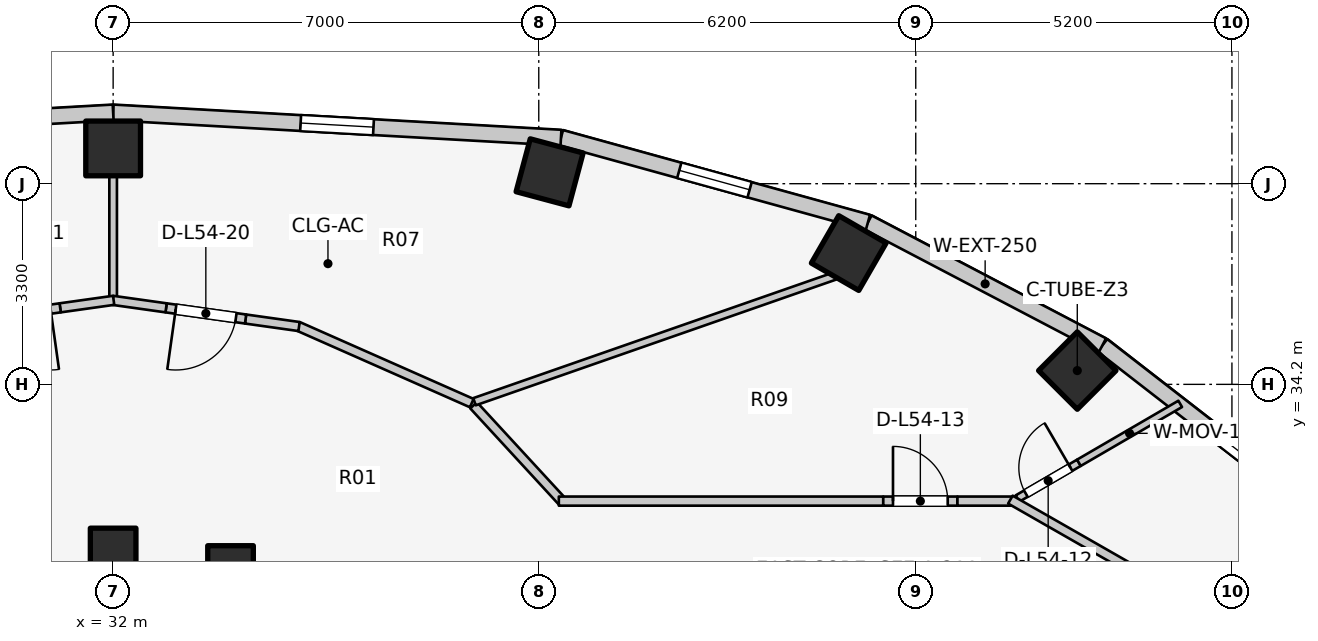
"""IFC4 building model, lengths in metres.
Left out: names, types, materials, properties, quantities, classifications, styles, units other than length and angle.
Written with IfcOpenShell. Run it as: python <this file> out.ifc"""

import sys

from ifc_helpers import new_model, si_unit, direction, frame, frame_2d, origin, origin_2d, place, context, subcontext, project, spatial, rectangle, extrude, element, fill, save


model = new_model("IFC4")
c1 = context("Model", 3, precision=1e-05, world=origin(), true_north=direction((0.0, 1.0)))
c2 = subcontext(c1, "Body", "Model", "MODEL_VIEW")
j1 = project(units=[si_unit("LENGTHUNIT", "METRE"), si_unit("PLANEANGLEUNIT", "RADIAN")], contexts=[c1])
p1 = place(None, origin())
s1 = spatial("IfcSite", under=j1, at=p1, CompositionType="ELEMENT")
p2 = place(p1, origin())
s2 = spatial("IfcBuilding", under=s1, at=p2, CompositionType="ELEMENT")
p3 = place(p2, frame((0.0, 0.0, 177.7)))
s3 = spatial("IfcBuildingStorey", under=s2, at=p3, CompositionType="ELEMENT", Elevation=177.7)
for number, where, z_axis, x_axis in (
    (1, (47.857, 34.427, 0.0), (0.0, 0.0, 1.0), (0.707, 0.707, 0.0)),
    (2, (44.098, 36.359, 0.0), (0.0, 0.0, 1.0), (0.5, 0.866, 0.0)),
):
    element("IfcColumn", number, at=place(p3, frame(where, z_axis=z_axis, x_axis=x_axis)), inside=s3, PredefinedType="COLUMN", context=c2, shape_type="SweptSolid", body=[
        extrude(rectangle(XDim=0.9, YDim=0.9, at=origin_2d()), origin(), (0.0, 0.0, 1.0), 3.1),
    ])
p4 = place(p3, frame((33.931, 31.172, 0.0), z_axis=(0.0, 0.0, 1.0), x_axis=(1.0, 0.0, 0.0)))
e3 = element("IfcColumn", 3, at=p4, inside=s3, PredefinedType="COLUMN", context=c2, shape_type="SweptSolid", body=[
    extrude(rectangle(XDim=0.75, YDim=0.75, at=origin_2d()), origin(), (0.0, 0.0, 1.0), 3.1),
])
p5 = place(p3, frame((39.178, 37.687, 0.0), z_axis=(0.0, 0.0, 1.0), x_axis=(0.258819045103, 0.965925826289, 0.0)))
e4 = element("IfcColumn", 4, at=p5, inside=s3, PredefinedType="COLUMN", context=c2, shape_type="SweptSolid", body=[
    extrude(rectangle(XDim=0.9, YDim=0.9, at=origin_2d()), origin(), (0.0, 0.0, 1.0), 3.1),
])
p6 = place(p3, frame((32.0, 31.46, 0.0), z_axis=(0.0, 0.0, 1.0), x_axis=(1.0, 0.0, 0.0)))
e5 = element("IfcColumn", 5, at=p6, inside=s3, PredefinedType="COLUMN", context=c2, shape_type="SweptSolid", body=[
    extrude(rectangle(XDim=0.75, YDim=0.75, at=origin_2d()), origin(), (0.0, 0.0, 1.0), 3.1),
])
p7 = place(p3, frame((32.0, 38.08, 0.0), z_axis=(0.0, 0.0, 1.0), x_axis=(0.0, 1.0, 0.0)))
e6 = element("IfcColumn", 6, at=p7, inside=s3, PredefinedType="COLUMN", context=c2, shape_type="SweptSolid", body=[
    extrude(rectangle(XDim=0.9, YDim=0.9, at=origin_2d()), origin(), (0.0, 0.0, 1.0), 3.1),
])
p8 = place(p3, frame((51.619, 32.243, 0.0), z_axis=(0.0, 0.0, 1.0), x_axis=(-0.790185650662, 0.612867552973, 0.0)))
e7 = element("IfcWall", 7, at=p8, inside=s3, PredefinedType="STANDARD", context=c2, shape_type="SweptSolid", body=[
    extrude(rectangle(XDim=4.239, YDim=0.26, at=frame_2d((2.12, 0.0))), origin(), (0.0, 0.0, 1.0), 1.22),
])
p9 = place(p8, frame((0.749, 0.0, 0.15)))
e8 = element("IfcOpeningElement", 8, at=p9, cuts=e7, PredefinedType="OPENING", context=c2, shape_type="SweptSolid", body=[
    extrude(rectangle(XDim=1.2, YDim=0.9, at=frame_2d((0.6, 0.45))), frame((0.0, 0.14, 0.0), z_axis=(0.0, -1.0, 0.0), x_axis=(1.0, 0.0, 0.0)), (0.0, 0.0, 1.0), 0.28),
])
p10 = place(p3, frame((48.269, 34.842, 0.0), z_axis=(0.0, 0.0, 1.0), x_axis=(-0.885660265226, 0.464333818065, 0.0)))
e9 = element("IfcWall", 9, at=p10, inside=s3, PredefinedType="STANDARD", context=c2, shape_type="SweptSolid", body=[
    extrude(rectangle(XDim=4.354, YDim=0.26, at=frame_2d((2.177, 0.0))), origin(), (0.0, 0.0, 1.0), 1.22),
])
p11 = place(p3, frame((44.413, 36.863, 0.0), z_axis=(0.0, 0.0, 1.0), x_axis=(-0.963953455704, 0.26607092144, 0.0)))
e10 = element("IfcWall", 10, at=p11, inside=s3, PredefinedType="STANDARD", context=c2, shape_type="SweptSolid", body=[
    extrude(rectangle(XDim=5.237, YDim=0.26, at=frame_2d((2.618, 0.0))), origin(), (0.0, 0.0, 1.0), 1.22),
])
p12 = place(p11, frame((2.018, 0.0, 0.15)))
e11 = element("IfcOpeningElement", 11, at=p12, cuts=e10, PredefinedType="OPENING", context=c2, shape_type="SweptSolid", body=[
    extrude(rectangle(XDim=1.2, YDim=0.9, at=frame_2d((0.6, 0.45))), frame((0.0, 0.14, 0.0), z_axis=(0.0, -1.0, 0.0), x_axis=(1.0, 0.0, 0.0)), (0.0, 0.0, 1.0), 0.28),
])
p13 = place(p3, frame((39.365, 38.257, 0.0), z_axis=(0.0, 0.0, 1.0), x_axis=(-0.998417906562, 0.056228852534, 0.0)))
e12 = element("IfcWall", 12, at=p13, inside=s3, PredefinedType="STANDARD", context=c2, shape_type="SweptSolid", body=[
    extrude(rectangle(XDim=7.377, YDim=0.26, at=frame_2d((3.688, 0.0))), origin(), (0.0, 0.0, 1.0), 1.22),
])
p14 = place(p13, frame((3.088, 0.0, 0.15)))
e13 = element("IfcOpeningElement", 13, at=p14, cuts=e12, PredefinedType="OPENING", context=c2, shape_type="SweptSolid", body=[
    extrude(rectangle(XDim=1.2, YDim=0.9, at=frame_2d((0.6, 0.45))), frame((0.0, 0.14, 0.0), z_axis=(0.0, -1.0, 0.0), x_axis=(1.0, 0.0, 0.0)), (0.0, 0.0, 1.0), 0.28),
])
p15 = place(p3, frame((32.0, 38.671, 0.0), z_axis=(0.0, 0.0, 1.0), x_axis=(-0.998417906562, -0.056228852534, 0.0)))
e14 = element("IfcWall", 14, at=p15, inside=s3, PredefinedType="STANDARD", context=c2, shape_type="SweptSolid", body=[
    extrude(rectangle(XDim=7.377, YDim=0.26, at=frame_2d((3.688, 0.0))), origin(), (0.0, 0.0, 1.0), 1.22),
])
p16 = place(p15, frame((3.088, 0.0, 0.15)))
e15 = element("IfcOpeningElement", 15, at=p16, cuts=e14, PredefinedType="OPENING", context=c2, shape_type="SweptSolid", body=[
    extrude(rectangle(XDim=1.2, YDim=0.9, at=frame_2d((0.6, 0.45))), frame((0.0, 0.14, 0.0), z_axis=(0.0, -1.0, 0.0), x_axis=(1.0, 0.0, 0.0)), (0.0, 0.0, 1.0), 0.28),
])
p17 = place(p3, frame((46.872, 32.322, 0.0), z_axis=(0.0, 0.0, 1.0), x_axis=(0.864338442283, 0.502910585683, 0.0)))
e16 = element("IfcWall", 16, at=p17, inside=s3, PredefinedType="MOVABLE", context=c2, shape_type="SweptSolid", body=[
    extrude(rectangle(XDim=1.17, YDim=0.12, at=frame_2d((0.585, 0.0))), origin(), (0.0, 0.0, 1.0), 2.11),
])
p18 = place(p17, frame((0.16, 0.0, 0.0)))
e17 = element("IfcOpeningElement", 17, at=p18, cuts=e16, PredefinedType="OPENING", context=c2, shape_type="SweptSolid", body=[
    extrude(rectangle(XDim=0.85, YDim=2.05, at=frame_2d((0.425, 1.025))), frame((0.0, 0.07, 0.0), z_axis=(0.0, -1.0, 0.0), x_axis=(1.0, 0.0, 0.0)), (0.0, 0.0, 1.0), 0.14),
])
p19 = place(p3, frame((47.884, 32.91, 0.0), z_axis=(0.0, 0.0, 1.0), x_axis=(0.864444446654, 0.50272835473, 0.0)))
e18 = element("IfcWall", 18, at=p19, inside=s3, PredefinedType="MOVABLE", context=c2, shape_type="SweptSolid", body=[
    extrude(rectangle(XDim=1.927, YDim=0.12, at=frame_2d((0.963, 0.0))), origin(), (0.0, 0.0, 1.0), 1.22),
])
p20 = place(p3, frame((37.928, 33.856, 0.0), z_axis=(0.0, 0.0, 1.0), x_axis=(0.677579737957, -0.735449317567, 0.0)))
e19 = element("IfcWall", 19, at=p20, inside=s3, PredefinedType="PARTITIONING", context=c2, shape_type="SweptSolid", body=[
    extrude(rectangle(XDim=2.173, YDim=0.15, at=frame_2d((1.086, 0.0))), origin(), (0.0, 0.0, 1.0), 1.22),
])
p21 = place(p3, frame((39.33, 32.28, 0.0), z_axis=(0.0, 0.0, 1.0), x_axis=(1.0, 0.0, 0.0)))
e20 = element("IfcWall", 20, at=p21, inside=s3, PredefinedType="PARTITIONING", context=c2, shape_type="SweptSolid", body=[
    extrude(rectangle(XDim=5.336, YDim=0.15, at=frame_2d((2.668, 0.0))), origin(), (0.0, 0.0, 1.0), 1.22),
])
p22 = place(p3, frame((44.666, 32.28, 0.0), z_axis=(0.0, 0.0, 1.0), x_axis=(1.0, 0.0, 0.0)))
e21 = element("IfcWall", 21, at=p22, inside=s3, PredefinedType="PARTITIONING", context=c2, shape_type="SweptSolid", body=[
    extrude(rectangle(XDim=1.22, YDim=0.15, at=frame_2d((0.61, 0.0))), origin(), (0.0, 0.0, 1.0), 2.16),
])
p23 = place(p22, frame((0.16, 0.0, 0.0)))
e22 = element("IfcOpeningElement", 22, at=p23, cuts=e21, PredefinedType="OPENING", context=c2, shape_type="SweptSolid", body=[
    extrude(rectangle(XDim=0.9, YDim=2.1, at=frame_2d((0.45, 1.05))), frame((0.0, 0.085, 0.0), z_axis=(0.0, -1.0, 0.0), x_axis=(1.0, 0.0, 0.0)), (0.0, 0.0, 1.0), 0.17),
])
p24 = place(p3, frame((45.886, 32.28, 0.0), z_axis=(0.0, 0.0, 1.0), x_axis=(1.0, 0.0, 0.0)))
e23 = element("IfcWall", 23, at=p24, inside=s3, PredefinedType="PARTITIONING", context=c2, shape_type="SweptSolid", body=[
    extrude(rectangle(XDim=0.964, YDim=0.15, at=frame_2d((0.482, 0.0))), origin(), (0.0, 0.0, 1.0), 2.575),
])
p25 = place(p3, frame((46.757, 32.305, 0.0), z_axis=(0.0, 0.0, 1.0), x_axis=(0.867991349648, -0.496579315857, 0.0)))
e24 = element("IfcWall", 24, at=p25, inside=s3, PredefinedType="PARTITIONING", context=c2, shape_type="SweptSolid", body=[
    extrude(rectangle(XDim=2.567, YDim=0.15, at=frame_2d((1.283, 0.0))), origin(), (0.0, 0.0, 1.0), 1.22),
])
p26 = place(p3, frame((37.943, 33.914, 0.0), z_axis=(0.0, 0.0, 1.0), x_axis=(0.944182779284, 0.329422038278, 0.0)))
e25 = element("IfcWall", 25, at=p26, inside=s3, PredefinedType="PARTITIONING", context=c2, shape_type="SweptSolid", body=[
    extrude(rectangle(XDim=6.291, YDim=0.125, at=frame_2d((3.146, 0.0))), origin(), (0.0, 0.0, 1.0), 1.22),
])
p27 = place(p3, frame((32.0, 35.637, 0.0), z_axis=(0.0, 0.0, 1.0), x_axis=(0.0, 1.0, 0.0)))
e26 = element("IfcWall", 26, at=p27, inside=s3, PredefinedType="PARTITIONING", context=c2, shape_type="SweptSolid", body=[
    extrude(rectangle(XDim=2.013, YDim=0.125, at=frame_2d((1.006, 0.0))), origin(), (0.0, 0.0, 1.0), 1.22),
])
p28 = place(p3, frame((37.898, 33.892, 0.0), z_axis=(0.0, 0.0, 1.0), x_axis=(-0.914519212393, 0.40454247016, 0.0)))
e27 = element("IfcWall", 27, at=p28, inside=s3, PredefinedType="PARTITIONING", context=c2, shape_type="SweptSolid", body=[
    extrude(rectangle(XDim=3.124, YDim=0.15, at=frame_2d((1.562, 0.0))), origin(), (0.0, 0.0, 1.0), 1.22),
])
p29 = place(p3, frame((35.057, 35.151, 0.0), z_axis=(0.0, 0.0, 1.0), x_axis=(-0.990238800444, 0.139381197064, 0.0)))
e28 = element("IfcWall", 28, at=p29, inside=s3, PredefinedType="PARTITIONING", context=c2, shape_type="SweptSolid", body=[
    extrude(rectangle(XDim=0.888, YDim=0.15, at=frame_2d((0.444, 0.0))), origin(), (0.0, 0.0, 1.0), 2.575),
])
p30 = place(p3, frame((34.178, 35.275, 0.0), z_axis=(0.0, 0.0, 1.0), x_axis=(-0.990250599082, 0.139297347489, 0.0)))
e29 = element("IfcWall", 29, at=p30, inside=s3, PredefinedType="PARTITIONING", context=c2, shape_type="SweptSolid", body=[
    extrude(rectangle(XDim=1.32, YDim=0.15, at=frame_2d((0.66, 0.0))), origin(), (0.0, 0.0, 1.0), 2.575),
])
p31 = place(p30, frame((0.16, 0.0, 0.0)))
e30 = element("IfcOpeningElement", 30, at=p31, cuts=e29, PredefinedType="OPENING", context=c2, shape_type="SweptSolid", body=[
    extrude(rectangle(XDim=1.0, YDim=2.1, at=frame_2d((0.5, 1.05))), frame((0.0, 0.085, 0.0), z_axis=(0.0, -1.0, 0.0), x_axis=(1.0, 0.0, 0.0)), (0.0, 0.0, 1.0), 0.17),
])
for number, where, z_axis, x_axis in (
    (31, (32.871, 35.458, 0.0), (0.0, 0.0, 1.0), (-0.99, 0.139, 0.0)),
    (32, (32.008, 35.582, 0.0), (0.0, 0.0, 1.0), (-0.99, -0.139, 0.0)),
):
    element("IfcWall", number, at=place(p3, frame(where, z_axis=z_axis, x_axis=x_axis)), inside=s3, PredefinedType="PARTITIONING", context=c2, shape_type="SweptSolid", body=[
        extrude(rectangle(XDim=0.888, YDim=0.15, at=frame_2d((0.444, 0.0))), origin(), (0.0, 0.0, 1.0), 1.22),
    ])
p32 = place(p3, frame((31.129, 35.458, 0.0), z_axis=(0.0, 0.0, 1.0), x_axis=(-0.990254187593, -0.139271834751, 0.0)))
e33 = element("IfcWall", 33, at=p32, inside=s3, PredefinedType="PARTITIONING", context=c2, shape_type="SweptSolid", body=[
    extrude(rectangle(XDim=1.32, YDim=0.15, at=frame_2d((0.66, 0.0))), origin(), (0.0, 0.0, 1.0), 2.575),
])
p33 = place(p32, frame((0.16, 0.0, 0.0)))
e34 = element("IfcOpeningElement", 34, at=p33, cuts=e33, PredefinedType="OPENING", context=c2, shape_type="SweptSolid", body=[
    extrude(rectangle(XDim=1.0, YDim=2.1, at=frame_2d((0.5, 1.05))), frame((0.0, 0.085, 0.0), z_axis=(0.0, -1.0, 0.0), x_axis=(1.0, 0.0, 0.0)), (0.0, 0.0, 1.0), 0.17),
])
p34 = place(p9, origin())
e35 = element("IfcWindow", 35, at=p34, inside=s3, PartitioningType="SINGLE_PANEL", PredefinedType="WINDOW", context=c2, shape_type="SweptSolid", body=[
    extrude(rectangle(XDim=1.2, YDim=0.9, at=frame_2d((0.6, 0.45))), frame((0.0, 0.03, 0.0), z_axis=(0.0, -1.0, 0.0), x_axis=(1.0, 0.0, 0.0)), (0.0, 0.0, 1.0), 0.06),
])
fill(e8, e35)
p35 = place(p12, origin())
e36 = element("IfcWindow", 36, at=p35, inside=s3, PartitioningType="SINGLE_PANEL", PredefinedType="WINDOW", context=c2, shape_type="SweptSolid", body=[
    extrude(rectangle(XDim=1.2, YDim=0.9, at=frame_2d((0.6, 0.45))), frame((0.0, 0.03, 0.0), z_axis=(0.0, -1.0, 0.0), x_axis=(1.0, 0.0, 0.0)), (0.0, 0.0, 1.0), 0.06),
])
fill(e11, e36)
p36 = place(p14, origin())
e37 = element("IfcWindow", 37, at=p36, inside=s3, PartitioningType="SINGLE_PANEL", PredefinedType="WINDOW", context=c2, shape_type="SweptSolid", body=[
    extrude(rectangle(XDim=1.2, YDim=0.9, at=frame_2d((0.6, 0.45))), frame((0.0, 0.03, 0.0), z_axis=(0.0, -1.0, 0.0), x_axis=(1.0, 0.0, 0.0)), (0.0, 0.0, 1.0), 0.06),
])
fill(e13, e37)
p37 = place(p18, origin())
e38 = element("IfcDoor", 38, at=p37, inside=s3, OperationType="SINGLE_SWING_RIGHT", PredefinedType="DOOR", context=c2, shape_type="SweptSolid", body=[
    extrude(rectangle(XDim=0.85, YDim=2.05, at=frame_2d((0.425, 1.025))), frame((0.0, 0.025, 0.0), z_axis=(0.0, -1.0, 0.0), x_axis=(1.0, 0.0, 0.0)), (0.0, 0.0, 1.0), 0.05),
])
fill(e17, e38)
p38 = place(p23, origin())
e39 = element("IfcDoor", 39, at=p38, inside=s3, OperationType="SINGLE_SWING_LEFT", PredefinedType="DOOR", context=c2, shape_type="SweptSolid", body=[
    extrude(rectangle(XDim=0.9, YDim=2.1, at=frame_2d((0.45, 1.05))), frame((0.0, 0.025, 0.0), z_axis=(0.0, -1.0, 0.0), x_axis=(1.0, 0.0, 0.0)), (0.0, 0.0, 1.0), 0.05),
])
fill(e22, e39)
p39 = place(p31, origin())
e40 = element("IfcDoor", 40, at=p39, inside=s3, OperationType="SINGLE_SWING_RIGHT", PredefinedType="DOOR", context=c2, shape_type="SweptSolid", body=[
    extrude(rectangle(XDim=1.0, YDim=2.1, at=frame_2d((0.5, 1.05))), frame((0.0, 0.025, 0.0), z_axis=(0.0, -1.0, 0.0), x_axis=(1.0, 0.0, 0.0)), (0.0, 0.0, 1.0), 0.05),
])
fill(e30, e40)
save(model, sys.argv[1])
